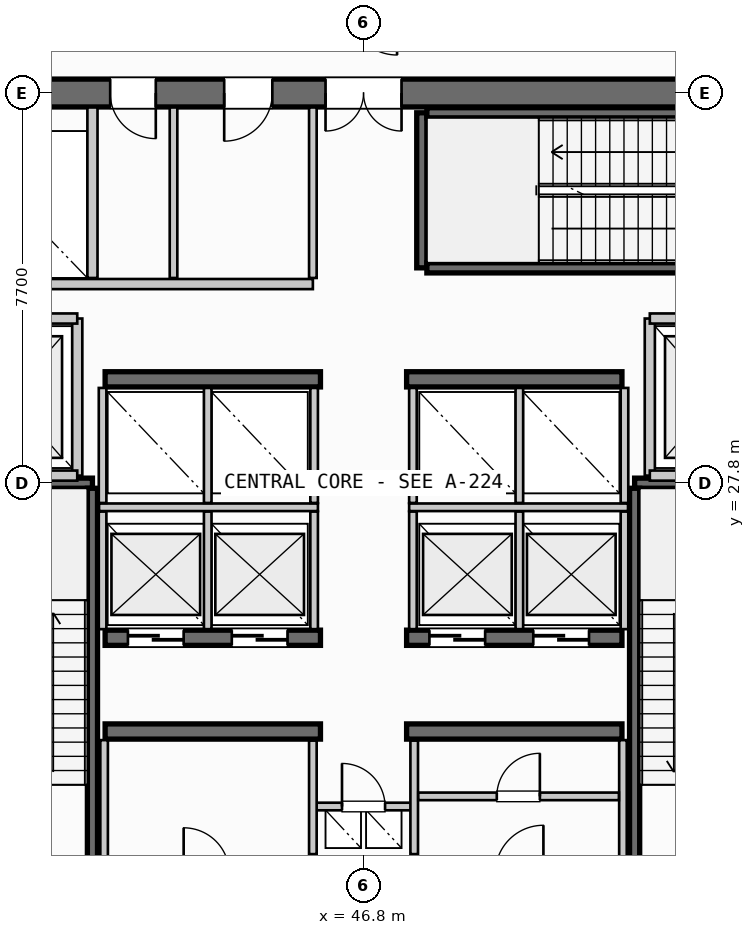
"""IFC4 building model, lengths in metres.
Left out: names, types, materials, properties, quantities, classifications, styles, units other than length and angle.
Written with IfcOpenShell. Run it as: python <this file> out.ifc"""

import sys

from ifc_helpers import new_model, si_unit, direction, frame, frame_2d, origin, place, context, subcontext, project, spatial, rectangle, extrude, source, transform, mapped, element, fill, save


model = new_model("IFC4")
c1 = context("Model", 3, precision=1e-05, world=origin(), true_north=direction((0.0, 1.0)))
c2 = subcontext(c1, "Body", "Model", "MODEL_VIEW")
j1 = project(units=[si_unit("LENGTHUNIT", "METRE"), si_unit("PLANEANGLEUNIT", "RADIAN")], contexts=[c1])
p1 = place(None, origin())
s1 = spatial("IfcSite", under=j1, at=p1, CompositionType="ELEMENT")
p2 = place(p1, origin())
s2 = spatial("IfcBuilding", under=s1, at=p2, CompositionType="ELEMENT")
p3 = place(p2, frame((0.0, 0.0, 171.4)))
s3 = spatial("IfcBuildingStorey", under=s2, at=p3, CompositionType="ELEMENT", Elevation=171.4)
p4 = place(p3, frame((55.6, 35.5, 0.0), z_axis=(0.0, 0.0, 1.0), x_axis=(-1.0, 0.0, 0.0)))
e1 = element("IfcWall", 1, at=p4, inside=s3, PredefinedType="SHEAR", context=c2, shape_type="SweptSolid", body=[
    extrude(rectangle(XDim=17.6, YDim=0.55, at=frame_2d((8.8, 0.0))), origin(), (0.0, 0.0, 1.0), 4.58),
])
p5 = place(p4, frame((8.05, 0.0, 0.0)))
e2 = element("IfcOpeningElement", 2, at=p5, cuts=e1, PredefinedType="OPENING", context=c2, shape_type="SweptSolid", body=[
    extrude(rectangle(XDim=1.5, YDim=2.2, at=frame_2d((0.75, 1.1))), frame((0.0, 0.285, 0.0), z_axis=(0.0, -1.0, 0.0), x_axis=(1.0, 0.0, 0.0)), (0.0, 0.0, 1.0), 0.57),
])
p6 = place(p4, frame((12.9, 0.0, 0.0)))
e3 = element("IfcOpeningElement", 3, at=p6, cuts=e1, PredefinedType="OPENING", context=c2, shape_type="SweptSolid", body=[
    extrude(rectangle(XDim=0.9, YDim=2.15, at=frame_2d((0.45, 1.075))), frame((0.0, 0.285, 0.0), z_axis=(0.0, -1.0, 0.0), x_axis=(1.0, 0.0, 0.0)), (0.0, 0.0, 1.0), 0.57),
])
p7 = place(p4, frame((10.6, 0.0, 0.0)))
e4 = element("IfcOpeningElement", 4, at=p7, cuts=e1, PredefinedType="OPENING", context=c2, shape_type="SweptSolid", body=[
    extrude(rectangle(XDim=0.95, YDim=2.15, at=frame_2d((0.475, 1.075))), frame((0.0, 0.285, 0.0), z_axis=(0.0, -1.0, 0.0), x_axis=(1.0, 0.0, 0.0)), (0.0, 0.0, 1.0), 0.57),
])
for number, where, z_axis, x_axis in (
    (5, (41.7, 22.9, 0.0), (0.0, 0.0, 1.0), (1.0, 0.0, 0.0)),
    (6, (47.65, 22.9, 0.0), (0.0, 0.0, 1.0), (1.0, 0.0, 0.0)),
):
    element("IfcWall", number, at=place(p3, frame(where, z_axis=z_axis, x_axis=x_axis)), inside=s3, PredefinedType="SHEAR", context=c2, shape_type="SweptSolid", body=[
        extrude(rectangle(XDim=4.25, YDim=0.3, at=frame_2d((2.125, 0.0))), origin(), (0.0, 0.0, 1.0), 4.58),
    ])
p8 = place(p3, frame((41.7, 24.75, 0.0), z_axis=(0.0, 0.0, 1.0), x_axis=(1.0, 0.0, 0.0)))
e7 = element("IfcWall", 7, at=p8, inside=s3, PredefinedType="SHEAR", context=c2, shape_type="SweptSolid", body=[
    extrude(rectangle(XDim=4.25, YDim=0.3, at=frame_2d((2.125, 0.0))), origin(), (0.0, 0.0, 1.0), 4.58),
])
p9 = place(p8, frame((0.45, 0.0, 0.0)))
e8 = element("IfcOpeningElement", 8, at=p9, cuts=e7, PredefinedType="OPENING", context=c2, shape_type="SweptSolid", body=[
    extrude(rectangle(XDim=1.1, YDim=2.2, at=frame_2d((0.55, 1.1))), frame((0.0, 0.16, 0.0), z_axis=(0.0, -1.0, 0.0), x_axis=(1.0, 0.0, 0.0)), (0.0, 0.0, 1.0), 0.32),
])
p10 = place(p8, frame((2.5, 0.0, 0.0)))
e9 = element("IfcOpeningElement", 9, at=p10, cuts=e7, PredefinedType="OPENING", context=c2, shape_type="SweptSolid", body=[
    extrude(rectangle(XDim=1.1, YDim=2.2, at=frame_2d((0.55, 1.1))), frame((0.0, 0.16, 0.0), z_axis=(0.0, -1.0, 0.0), x_axis=(1.0, 0.0, 0.0)), (0.0, 0.0, 1.0), 0.32),
])
p11 = place(p3, frame((47.65, 24.75, 0.0), z_axis=(0.0, 0.0, 1.0), x_axis=(1.0, 0.0, 0.0)))
e10 = element("IfcWall", 10, at=p11, inside=s3, PredefinedType="SHEAR", context=c2, shape_type="SweptSolid", body=[
    extrude(rectangle(XDim=4.25, YDim=0.3, at=frame_2d((2.125, 0.0))), origin(), (0.0, 0.0, 1.0), 4.58),
])
p12 = place(p11, frame((0.45, 0.0, 0.0)))
e11 = element("IfcOpeningElement", 11, at=p12, cuts=e10, PredefinedType="OPENING", context=c2, shape_type="SweptSolid", body=[
    extrude(rectangle(XDim=1.1, YDim=2.2, at=frame_2d((0.55, 1.1))), frame((0.0, 0.16, 0.0), z_axis=(0.0, -1.0, 0.0), x_axis=(1.0, 0.0, 0.0)), (0.0, 0.0, 1.0), 0.32),
])
p13 = place(p11, frame((2.5, 0.0, 0.0)))
e12 = element("IfcOpeningElement", 12, at=p13, cuts=e10, PredefinedType="OPENING", context=c2, shape_type="SweptSolid", body=[
    extrude(rectangle(XDim=1.1, YDim=2.2, at=frame_2d((0.55, 1.1))), frame((0.0, 0.16, 0.0), z_axis=(0.0, -1.0, 0.0), x_axis=(1.0, 0.0, 0.0)), (0.0, 0.0, 1.0), 0.32),
])
for number, where, z_axis, x_axis in (
    (13, (41.7, 29.85, 0.0), (0.0, 0.0, 1.0), (1.0, 0.0, 0.0)),
    (14, (47.65, 29.85, 0.0), (0.0, 0.0, 1.0), (1.0, 0.0, 0.0)),
):
    element("IfcWall", number, at=place(p3, frame(where, z_axis=z_axis, x_axis=x_axis)), inside=s3, PredefinedType="SHEAR", context=c2, shape_type="SweptSolid", body=[
        extrude(rectangle(XDim=4.25, YDim=0.3, at=frame_2d((2.125, 0.0))), origin(), (0.0, 0.0, 1.0), 4.58),
    ])
p14 = place(p3, frame((38.39, 27.8, 0.0), z_axis=(0.0, 0.0, 1.0), x_axis=(1.0, 0.0, 0.0)))
e15 = element("IfcWall", 15, at=p14, inside=s3, PredefinedType="SHEAR", context=c2, shape_type="SweptSolid", body=[
    extrude(rectangle(XDim=3.06, YDim=0.2, at=frame_2d((1.53, 0.0))), origin(), (0.0, 0.0, 1.0), 4.58),
])
p15 = place(p3, frame((41.45, 27.7, 0.0), z_axis=(0.0, 0.0, 1.0), x_axis=(0.0, -1.0, 0.0)))
e16 = element("IfcWall", 16, at=p15, inside=s3, PredefinedType="SHEAR", context=c2, shape_type="SweptSolid", body=[
    extrude(rectangle(XDim=7.35, YDim=0.2, at=frame_2d((3.675, 0.0))), origin(), (0.0, 0.0, 1.0), 4.58),
])
p16 = place(p3, frame((52.15, 27.8, 0.0), z_axis=(0.0, 0.0, 1.0), x_axis=(1.0, 0.0, 0.0)))
e17 = element("IfcWall", 17, at=p16, inside=s3, PredefinedType="SHEAR", context=c2, shape_type="SweptSolid", body=[
    extrude(rectangle(XDim=3.06, YDim=0.2, at=frame_2d((1.53, 0.0))), origin(), (0.0, 0.0, 1.0), 4.58),
])
p17 = place(p3, frame((52.15, 20.35, 0.0), z_axis=(0.0, 0.0, 1.0), x_axis=(0.0, 1.0, 0.0)))
e18 = element("IfcWall", 18, at=p17, inside=s3, PredefinedType="SHEAR", context=c2, shape_type="SweptSolid", body=[
    extrude(rectangle(XDim=7.35, YDim=0.2, at=frame_2d((3.675, 0.0))), origin(), (0.0, 0.0, 1.0), 4.58),
])
p18 = place(p3, frame((47.95, 32.05, 0.0), z_axis=(0.0, 0.0, 1.0), x_axis=(0.0, 1.0, 0.0)))
e19 = element("IfcWall", 19, at=p18, inside=s3, PredefinedType="SHEAR", context=c2, shape_type="SweptSolid", body=[
    extrude(rectangle(XDim=3.06, YDim=0.2, at=frame_2d((1.53, 0.0))), origin(), (0.0, 0.0, 1.0), 4.58),
])
for number, where, z_axis, x_axis in (
    (20, (48.05, 35.11, 0.0), (0.0, 0.0, 1.0), (1.0, 0.0, 0.0)),
    (21, (55.4, 32.05, 0.0), (0.0, 0.0, 1.0), (-1.0, 0.0, 0.0)),
):
    element("IfcWall", number, at=place(p3, frame(where, z_axis=z_axis, x_axis=x_axis)), inside=s3, PredefinedType="SHEAR", context=c2, shape_type="SweptSolid", body=[
        extrude(rectangle(XDim=7.35, YDim=0.2, at=frame_2d((3.675, 0.0))), origin(), (0.0, 0.0, 1.0), 4.58),
    ])
p19 = place(p3, frame((45.8, 21.42, 0.0), z_axis=(0.0, 0.0, 1.0), x_axis=(1.0, 0.0, 0.0)))
e22 = element("IfcWall", 22, at=p19, inside=s3, PredefinedType="PARTITIONING", context=c2, shape_type="SweptSolid", body=[
    extrude(rectangle(XDim=2.0, YDim=0.15, at=frame_2d((1.0, 0.0))), origin(), (0.0, 0.0, 1.0), 2.355),
])
p20 = place(p19, frame((0.575, 0.0, 0.0)))
e23 = element("IfcOpeningElement", 23, at=p20, cuts=e22, PredefinedType="OPENING", context=c2, shape_type="SweptSolid", body=[
    extrude(rectangle(XDim=0.85, YDim=2.15, at=frame_2d((0.425, 1.075))), frame((0.0, 0.085, 0.0), z_axis=(0.0, -1.0, 0.0), x_axis=(1.0, 0.0, 0.0)), (0.0, 0.0, 1.0), 0.17),
])
for number, where, z_axis, x_axis in (
    (24, (45.8, 20.48, 0.0), (0.0, 0.0, 1.0), (0.0, 1.0, 0.0)),
    (25, (47.8, 20.48, 0.0), (0.0, 0.0, 1.0), (0.0, 1.0, 0.0)),
):
    element("IfcWall", number, at=place(p3, frame(where, z_axis=z_axis, x_axis=x_axis)), inside=s3, PredefinedType="PARTITIONING", context=c2, shape_type="SweptSolid", body=[
        extrude(rectangle(XDim=2.24, YDim=0.15, at=frame_2d((1.12, 0.0))), origin(), (0.0, 0.0, 1.0), 2.355),
    ])
p21 = place(p3, frame((41.15, 27.95, 0.0), z_axis=(0.0, 0.0, 1.0), x_axis=(0.0, 1.0, 0.0)))
e26 = element("IfcWall", 26, at=p21, inside=s3, PredefinedType="PARTITIONING", context=c2, shape_type="SweptSolid", body=[
    extrude(rectangle(XDim=3.1, YDim=0.2, at=frame_2d((1.55, 0.0))), origin(), (0.0, 0.0, 1.0), 2.355),
])
for number, where, z_axis, x_axis in (
    (27, (38.285, 27.95, 0.0), (0.0, 0.0, 1.0), (1.0, 0.0, 0.0)),
    (28, (38.285, 31.05, 0.0), (0.0, 0.0, 1.0), (1.0, 0.0, 0.0)),
):
    element("IfcWall", number, at=place(p3, frame(where, z_axis=z_axis, x_axis=x_axis)), inside=s3, PredefinedType="PARTITIONING", context=c2, shape_type="SweptSolid", body=[
        extrude(rectangle(XDim=2.865, YDim=0.2, at=frame_2d((1.433, 0.0))), origin(), (0.0, 0.0, 1.0), 2.355),
    ])
p22 = place(p3, frame((52.45, 27.95, 0.0), z_axis=(0.0, 0.0, 1.0), x_axis=(0.0, 1.0, 0.0)))
e29 = element("IfcWall", 29, at=p22, inside=s3, PredefinedType="PARTITIONING", context=c2, shape_type="SweptSolid", body=[
    extrude(rectangle(XDim=3.1, YDim=0.2, at=frame_2d((1.55, 0.0))), origin(), (0.0, 0.0, 1.0), 2.355),
])
for number, where, z_axis, x_axis in (
    (30, (52.45, 27.95, 0.0), (0.0, 0.0, 1.0), (1.0, 0.0, 0.0)),
    (31, (52.45, 31.05, 0.0), (0.0, 0.0, 1.0), (1.0, 0.0, 0.0)),
):
    element("IfcWall", number, at=place(p3, frame(where, z_axis=z_axis, x_axis=x_axis)), inside=s3, PredefinedType="PARTITIONING", context=c2, shape_type="SweptSolid", body=[
        extrude(rectangle(XDim=2.865, YDim=0.2, at=frame_2d((1.433, 0.0))), origin(), (0.0, 0.0, 1.0), 2.355),
    ])
for number, where, z_axis, x_axis in (
    (32, (41.68, 20.385, 0.0), (0.0, 0.0, 1.0), (0.0, 1.0, 0.0)),
    (33, (51.92, 20.385, 0.0), (0.0, 0.0, 1.0), (0.0, 1.0, 0.0)),
):
    element("IfcWall", number, at=place(p3, frame(where, z_axis=z_axis, x_axis=x_axis)), inside=s3, PredefinedType="PARTITIONING", context=c2, shape_type="SweptSolid", body=[
        extrude(rectangle(XDim=2.345, YDim=0.15, at=frame_2d((1.172, 0.0))), origin(), (0.0, 0.0, 1.0), 2.355),
    ])
p23 = place(p3, frame((47.88, 21.62, 0.0), z_axis=(0.0, 0.0, 1.0), x_axis=(1.0, 0.0, 0.0)))
e34 = element("IfcWall", 34, at=p23, inside=s3, PredefinedType="PARTITIONING", context=c2, shape_type="SweptSolid", body=[
    extrude(rectangle(XDim=3.96, YDim=0.15, at=frame_2d((1.98, 0.0))), origin(), (0.0, 0.0, 1.0), 2.355),
])
p24 = place(p23, frame((1.55, 0.0, 0.0)))
e35 = element("IfcOpeningElement", 35, at=p24, cuts=e34, PredefinedType="OPENING", context=c2, shape_type="SweptSolid", body=[
    extrude(rectangle(XDim=0.85, YDim=2.15, at=frame_2d((0.425, 1.075))), frame((0.0, 0.085, 0.0), z_axis=(0.0, -1.0, 0.0), x_axis=(1.0, 0.0, 0.0)), (0.0, 0.0, 1.0), 0.17),
])
p25 = place(p3, frame((41.58, 27.325, 0.0), z_axis=(0.0, 0.0, 1.0), x_axis=(1.0, 0.0, 0.0)))
e36 = element("IfcWall", 36, at=p25, inside=s3, PredefinedType="PARTITIONING", context=c2, shape_type="SweptSolid", body=[
    extrude(rectangle(XDim=4.32, YDim=0.15, at=frame_2d((2.16, 0.0))), origin(), (0.0, 0.0, 1.0), 2.355),
])
p26 = place(p3, frame((47.7, 27.325, 0.0), z_axis=(0.0, 0.0, 1.0), x_axis=(1.0, 0.0, 0.0)))
e37 = element("IfcWall", 37, at=p26, inside=s3, PredefinedType="PARTITIONING", context=c2, shape_type="SweptSolid", body=[
    extrude(rectangle(XDim=4.32, YDim=0.15, at=frame_2d((2.16, 0.0))), origin(), (0.0, 0.0, 1.0), 2.355),
])
for number, where, z_axis, x_axis in (
    (38, (41.65, 24.92, 0.0), (0.0, 0.0, 1.0), (0.0, 1.0, 0.0)),
    (39, (43.725, 24.92, 0.0), (0.0, 0.0, 1.0), (0.0, 1.0, 0.0)),
    (40, (45.825, 24.92, 0.0), (0.0, 0.0, 1.0), (0.0, 1.0, 0.0)),
    (41, (47.775, 24.92, 0.0), (0.0, 0.0, 1.0), (0.0, 1.0, 0.0)),
    (42, (49.875, 24.92, 0.0), (0.0, 0.0, 1.0), (0.0, 1.0, 0.0)),
    (43, (51.95, 24.92, 0.0), (0.0, 0.0, 1.0), (0.0, 1.0, 0.0)),
):
    element("IfcWall", number, at=place(p3, frame(where, z_axis=z_axis, x_axis=x_axis)), inside=s3, PredefinedType="PARTITIONING", context=c2, shape_type="SweptSolid", body=[
        extrude(rectangle(XDim=2.32, YDim=0.15, at=frame_2d((1.16, 0.0))), origin(), (0.0, 0.0, 1.0), 2.355),
    ])
for number, where, z_axis, x_axis in (
    (44, (41.65, 27.41, 0.0), (0.0, 0.0, 1.0), (0.0, 1.0, 0.0)),
    (45, (43.725, 27.41, 0.0), (0.0, 0.0, 1.0), (0.0, 1.0, 0.0)),
    (46, (45.825, 27.41, 0.0), (0.0, 0.0, 1.0), (0.0, 1.0, 0.0)),
    (47, (47.775, 27.41, 0.0), (0.0, 0.0, 1.0), (0.0, 1.0, 0.0)),
    (48, (49.875, 27.41, 0.0), (0.0, 0.0, 1.0), (0.0, 1.0, 0.0)),
    (49, (51.95, 27.41, 0.0), (0.0, 0.0, 1.0), (0.0, 1.0, 0.0)),
):
    element("IfcWall", number, at=place(p3, frame(where, z_axis=z_axis, x_axis=x_axis)), inside=s3, PredefinedType="PARTITIONING", context=c2, shape_type="SweptSolid", body=[
        extrude(rectangle(XDim=2.27, YDim=0.15, at=frame_2d((1.135, 0.0))), origin(), (0.0, 0.0, 1.0), 2.355),
    ])
p27 = place(p3, frame((41.45, 31.85, 0.0), z_axis=(0.0, 0.0, 1.0), x_axis=(0.0, 1.0, 0.0)))
e50 = element("IfcWall", 50, at=p27, inside=s3, PredefinedType="PARTITIONING", context=c2, shape_type="SweptSolid", body=[
    extrude(rectangle(XDim=3.365, YDim=0.2, at=frame_2d((1.683, 0.0))), origin(), (0.0, 0.0, 1.0), 2.355),
])
p28 = place(p3, frame((38.285, 31.73, 0.0), z_axis=(0.0, 0.0, 1.0), x_axis=(1.0, 0.0, 0.0)))
e51 = element("IfcWall", 51, at=p28, inside=s3, PredefinedType="PARTITIONING", context=c2, shape_type="SweptSolid", body=[
    extrude(rectangle(XDim=7.515, YDim=0.2, at=frame_2d((3.758, 0.0))), origin(), (0.0, 0.0, 1.0), 2.355),
])
p29 = place(p3, frame((45.8, 31.85, 0.0), z_axis=(0.0, 0.0, 1.0), x_axis=(0.0, 1.0, 0.0)))
e52 = element("IfcWall", 52, at=p29, inside=s3, PredefinedType="PARTITIONING", context=c2, shape_type="SweptSolid", body=[
    extrude(rectangle(XDim=3.365, YDim=0.15, at=frame_2d((1.683, 0.0))), origin(), (0.0, 0.0, 1.0), 2.355),
])
p30 = place(p3, frame((43.05, 31.85, 0.0), z_axis=(0.0, 0.0, 1.0), x_axis=(0.0, 1.0, 0.0)))
e53 = element("IfcWall", 53, at=p30, inside=s3, PredefinedType="PLUMBINGWALL", context=c2, shape_type="SweptSolid", body=[
    extrude(rectangle(XDim=3.365, YDim=0.15, at=frame_2d((1.683, 0.0))), origin(), (0.0, 0.0, 1.0), 2.355),
])
m1 = source(origin(), c2, "Body", "SweptSolid", [
    extrude(rectangle(XDim=1.5, YDim=2.2, at=frame_2d((0.75, 1.1))), frame((0.0, 0.025, 0.0), z_axis=(0.0, -1.0, 0.0), x_axis=(1.0, 0.0, 0.0)), (0.0, 0.0, 1.0), 0.05),
])
p31 = place(p5, origin())
e54 = element("IfcDoor", 54, at=p31, inside=s3, OperationType="DOUBLE_DOOR_SINGLE_SWING", PredefinedType="DOOR", context=c2, shape_type="MappedRepresentation", body=[
    mapped(m1, transform((0.0, 0.0, 0.0), scale=1.0)),
])
fill(e2, e54)
m2 = source(origin(), c2, "Body", "SweptSolid", [
    extrude(rectangle(XDim=1.1, YDim=2.2, at=frame_2d((0.55, 1.1))), frame((0.0, 0.025, 0.0), z_axis=(0.0, -1.0, 0.0), x_axis=(1.0, 0.0, 0.0)), (0.0, 0.0, 1.0), 0.05),
])
p32 = place(p9, origin())
e55 = element("IfcDoor", 55, at=p32, inside=s3, OperationType="SLIDING_TO_RIGHT", PredefinedType="DOOR", context=c2, shape_type="MappedRepresentation", body=[
    mapped(m2, transform((0.0, 0.0, 0.0), scale=1.0)),
])
fill(e8, e55)
p33 = place(p10, origin())
e56 = element("IfcDoor", 56, at=p33, inside=s3, OperationType="SLIDING_TO_RIGHT", PredefinedType="DOOR", context=c2, shape_type="MappedRepresentation", body=[
    mapped(m2, transform((0.0, 0.0, 0.0), scale=1.0)),
])
fill(e9, e56)
p34 = place(p12, origin())
e57 = element("IfcDoor", 57, at=p34, inside=s3, OperationType="SLIDING_TO_RIGHT", PredefinedType="DOOR", context=c2, shape_type="MappedRepresentation", body=[
    mapped(m2, transform((0.0, 0.0, 0.0), scale=1.0)),
])
fill(e11, e57)
p35 = place(p13, origin())
e58 = element("IfcDoor", 58, at=p35, inside=s3, OperationType="SLIDING_TO_RIGHT", PredefinedType="DOOR", context=c2, shape_type="MappedRepresentation", body=[
    mapped(m2, transform((0.0, 0.0, 0.0), scale=1.0)),
])
fill(e12, e58)
m3 = source(origin(), c2, "Body", "SweptSolid", [
    extrude(rectangle(XDim=0.9, YDim=2.15, at=frame_2d((0.45, 1.075))), frame((0.0, 0.025, 0.0), z_axis=(0.0, -1.0, 0.0), x_axis=(1.0, 0.0, 0.0)), (0.0, 0.0, 1.0), 0.05),
])
p36 = place(p6, origin())
e59 = element("IfcDoor", 59, at=p36, inside=s3, OperationType="SINGLE_SWING_LEFT", PredefinedType="DOOR", context=c2, shape_type="MappedRepresentation", body=[
    mapped(m3, transform((0.0, 0.0, 0.0), scale=1.0)),
])
fill(e3, e59)
m4 = source(origin(), c2, "Body", "SweptSolid", [
    extrude(rectangle(XDim=0.95, YDim=2.15, at=frame_2d((0.475, 1.075))), frame((0.0, 0.025, 0.0), z_axis=(0.0, -1.0, 0.0), x_axis=(1.0, 0.0, 0.0)), (0.0, 0.0, 1.0), 0.05),
])
p37 = place(p7, origin())
e60 = element("IfcDoor", 60, at=p37, inside=s3, OperationType="SINGLE_SWING_RIGHT", PredefinedType="DOOR", context=c2, shape_type="MappedRepresentation", body=[
    mapped(m4, transform((0.0, 0.0, 0.0), scale=1.0)),
])
fill(e4, e60)
m5 = source(origin(), c2, "Body", "SweptSolid", [
    extrude(rectangle(XDim=0.85, YDim=2.15, at=frame_2d((0.425, 1.075))), frame((0.0, 0.025, 0.0), z_axis=(0.0, -1.0, 0.0), x_axis=(1.0, 0.0, 0.0)), (0.0, 0.0, 1.0), 0.05),
])
p38 = place(p24, origin())
e61 = element("IfcDoor", 61, at=p38, inside=s3, OperationType="SINGLE_SWING_RIGHT", PredefinedType="DOOR", context=c2, shape_type="MappedRepresentation", body=[
    mapped(m5, transform((0.0, 0.0, 0.0), scale=1.0)),
])
fill(e35, e61)
p39 = place(p20, origin())
e62 = element("IfcDoor", 62, at=p39, inside=s3, OperationType="SINGLE_SWING_LEFT", PredefinedType="DOOR", context=c2, shape_type="MappedRepresentation", body=[
    mapped(m5, transform((0.0, 0.0, 0.0), scale=1.0)),
])
fill(e23, e62)
save(model, sys.argv[1])
